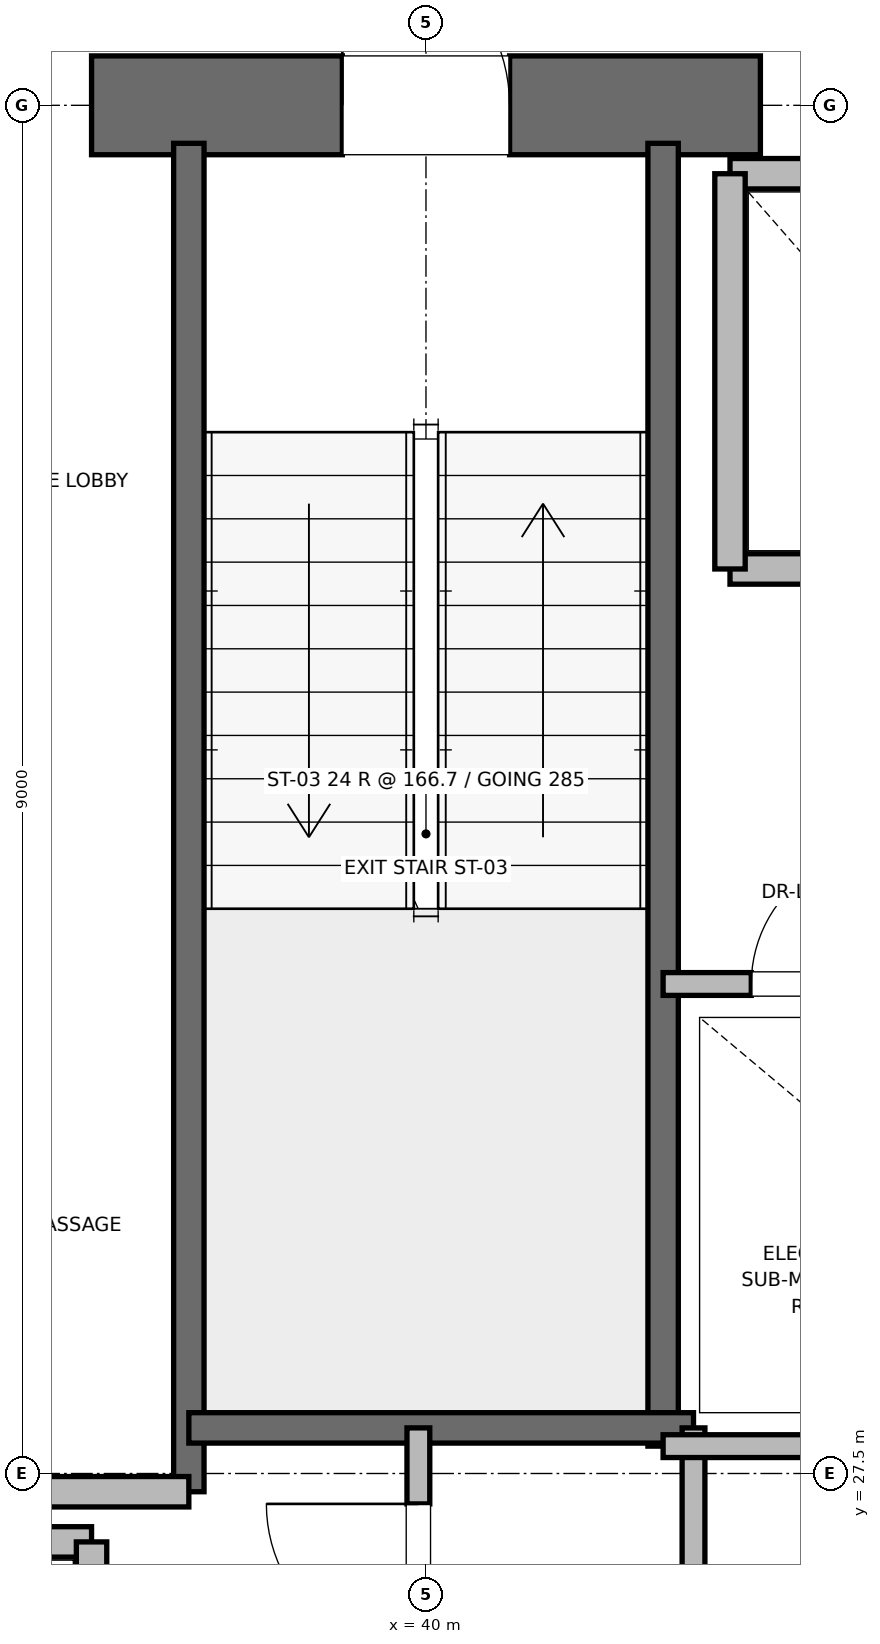
"""IFC4 building model, lengths in metres.
Left out: names, types, materials, properties, quantities, classifications, styles, units other than length and angle.
Written with IfcOpenShell. Run it as: python <this file> out.ifc"""

import sys

from ifc_helpers import new_model, si_unit, direction, frame, frame_2d, origin, place, context, subcontext, project, spatial, rectangle, extrude, element, fill, save


model = new_model("IFC4")
c1 = context("Model", 3, precision=1e-05, world=origin(), true_north=direction((0.0, 1.0)))
c2 = subcontext(c1, "Body", "Model", "MODEL_VIEW")
j1 = project(units=[si_unit("LENGTHUNIT", "METRE"), si_unit("PLANEANGLEUNIT", "RADIAN")], contexts=[c1])
p1 = place(None, origin())
s1 = spatial("IfcSite", under=j1, at=p1, CompositionType="ELEMENT")
p2 = place(p1, origin())
s2 = spatial("IfcBuilding", under=s1, at=p2, CompositionType="ELEMENT")
p3 = place(p2, frame((0.0, 0.0, 75.6)))
s3 = spatial("IfcBuildingStorey", under=s2, at=p3, CompositionType="ELEMENT", Elevation=75.6)
p4 = place(p3, frame((37.8, 36.5, 0.0), z_axis=(0.0, 0.0, 1.0), x_axis=(1.0, 0.0, 0.0)))
e1 = element("IfcWall", 1, at=p4, inside=s3, PredefinedType="SHEAR", context=c2, shape_type="SweptSolid", body=[
    extrude(rectangle(XDim=4.4, YDim=0.65, at=frame_2d((2.2, 0.0))), origin(), (0.0, 0.0, 1.0), 3.76),
])
p5 = place(p4, frame((1.65, 0.0, 0.0)))
e2 = element("IfcOpeningElement", 2, at=p5, cuts=e1, PredefinedType="OPENING", context=c2, shape_type="SweptSolid", body=[
    extrude(rectangle(XDim=1.1, YDim=2.15, at=frame_2d((0.55, 1.075))), frame((0.0, 0.325, 0.0), z_axis=(0.0, -1.0, 0.0), x_axis=(1.0, 0.0, 0.0)), (0.0, 0.0, 1.0), 0.65),
])
p6 = place(p3, frame((38.44, 27.38, 0.0), z_axis=(0.0, 0.0, 1.0), x_axis=(0.0, 1.0, 0.0)))
e3 = element("IfcWall", 3, at=p6, inside=s3, PredefinedType="SOLIDWALL", context=c2, shape_type="SweptSolid", body=[
    extrude(rectangle(XDim=8.87, YDim=0.2, at=frame_2d((4.435, 0.0))), origin(), (0.0, 0.0, 1.0), 3.76),
])
p7 = place(p3, frame((41.56, 27.68, 0.0), z_axis=(0.0, 0.0, 1.0), x_axis=(0.0, 1.0, 0.0)))
e4 = element("IfcWall", 4, at=p7, inside=s3, PredefinedType="SOLIDWALL", context=c2, shape_type="SweptSolid", body=[
    extrude(rectangle(XDim=8.57, YDim=0.2, at=frame_2d((4.285, 0.0))), origin(), (0.0, 0.0, 1.0), 3.76),
])
p8 = place(p3, frame((38.44, 27.8, 0.0), z_axis=(0.0, 0.0, 1.0), x_axis=(1.0, 0.0, 0.0)))
e5 = element("IfcWall", 5, at=p8, inside=s3, PredefinedType="SOLIDWALL", context=c2, shape_type="SweptSolid", body=[
    extrude(rectangle(XDim=3.32, YDim=0.2, at=frame_2d((1.66, 0.0))), origin(), (0.0, 0.0, 1.0), 3.76),
])
p9 = place(p3, frame((32.82, 27.38, 0.0), z_axis=(0.0, 0.0, 1.0), x_axis=(1.0, 0.0, 0.0)))
e6 = element("IfcWall", 6, at=p9, inside=s3, PredefinedType="PARTITIONING", context=c2, shape_type="SweptSolid", body=[
    extrude(rectangle(XDim=5.62, YDim=0.2, at=frame_2d((2.81, 0.0))), origin(), (0.0, 0.0, 1.0), 3.76),
])
p10 = place(p3, frame((37.8, 27.05, 0.0), z_axis=(0.0, 0.0, 1.0), x_axis=(-1.0, 0.0, 0.0)))
e7 = element("IfcWall", 7, at=p10, inside=s3, PredefinedType="SOLIDWALL", context=c2, shape_type="SweptSolid", body=[
    extrude(rectangle(XDim=2.3, YDim=0.2, at=frame_2d((1.15, 0.0))), origin(), (0.0, 0.0, 1.0), 3.76),
])
p11 = place(p3, frame((37.8, 24.45, 0.0), z_axis=(0.0, 0.0, 1.0), x_axis=(0.0, 1.0, 0.0)))
e8 = element("IfcWall", 8, at=p11, inside=s3, PredefinedType="SOLIDWALL", context=c2, shape_type="SweptSolid", body=[
    extrude(rectangle(XDim=2.6, YDim=0.2, at=frame_2d((1.3, 0.0))), origin(), (0.0, 0.0, 1.0), 3.76),
])
p12 = place(p3, frame((42.0, 33.45, 0.0), z_axis=(0.0, 0.0, 1.0), x_axis=(1.0, 0.0, 0.0)))
e9 = element("IfcWall", 9, at=p12, inside=s3, PredefinedType="SOLIDWALL", context=c2, shape_type="SweptSolid", body=[
    extrude(rectangle(XDim=2.3, YDim=0.2, at=frame_2d((1.15, 0.0))), origin(), (0.0, 0.0, 1.0), 3.76),
])
p13 = place(p3, frame((44.3, 36.05, 0.0), z_axis=(0.0, 0.0, 1.0), x_axis=(-1.0, 0.0, 0.0)))
e10 = element("IfcWall", 10, at=p13, inside=s3, PredefinedType="SOLIDWALL", context=c2, shape_type="SweptSolid", body=[
    extrude(rectangle(XDim=2.3, YDim=0.2, at=frame_2d((1.15, 0.0))), origin(), (0.0, 0.0, 1.0), 2.54),
])
p14 = place(p3, frame((42.0, 36.05, 0.0), z_axis=(0.0, 0.0, 1.0), x_axis=(0.0, -1.0, 0.0)))
e11 = element("IfcWall", 11, at=p14, inside=s3, PredefinedType="SOLIDWALL", context=c2, shape_type="SweptSolid", body=[
    extrude(rectangle(XDim=2.6, YDim=0.2, at=frame_2d((1.3, 0.0))), origin(), (0.0, 0.0, 1.0), 2.54),
])
p15 = place(p3, frame((41.76, 23.8, 0.0), z_axis=(0.0, 0.0, 1.0), x_axis=(0.0, 1.0, 0.0)))
e12 = element("IfcWall", 12, at=p15, inside=s3, PredefinedType="PARTITIONING", context=c2, shape_type="SweptSolid", body=[
    extrude(rectangle(XDim=4.0, YDim=0.15, at=frame_2d((2.0, 0.0))), origin(), (0.0, 0.0, 1.0), 2.85),
])
p16 = place(p3, frame((39.95, 25.8, 0.0), z_axis=(0.0, 0.0, 1.0), x_axis=(0.0, 1.0, 0.0)))
e13 = element("IfcWall", 13, at=p16, inside=s3, PredefinedType="PARTITIONING", context=c2, shape_type="SweptSolid", body=[
    extrude(rectangle(XDim=2.0, YDim=0.15, at=frame_2d((1.0, 0.0))), origin(), (0.0, 0.0, 1.0), 2.85),
])
p17 = place(p16, frame((0.5, 0.0, 0.0)))
e14 = element("IfcOpeningElement", 14, at=p17, cuts=e13, PredefinedType="OPENING", context=c2, shape_type="SweptSolid", body=[
    extrude(rectangle(XDim=1.0, YDim=2.15, at=frame_2d((0.5, 1.075))), frame((0.0, 0.075, 0.0), z_axis=(0.0, -1.0, 0.0), x_axis=(1.0, 0.0, 0.0)), (0.0, 0.0, 1.0), 0.15),
])
p18 = place(p3, frame((41.56, 27.68, 0.0), z_axis=(0.0, 0.0, 1.0), x_axis=(1.0, 0.0, 0.0)))
e15 = element("IfcWall", 15, at=p18, inside=s3, PredefinedType="PARTITIONING", context=c2, shape_type="SweptSolid", body=[
    extrude(rectangle(XDim=3.59, YDim=0.15, at=frame_2d((1.795, 0.0))), origin(), (0.0, 0.0, 1.0), 2.85),
])
p19 = place(p3, frame((41.56, 30.72, 0.0), z_axis=(0.0, 0.0, 1.0), x_axis=(1.0, 0.0, 0.0)))
e16 = element("IfcWall", 16, at=p19, inside=s3, PredefinedType="PARTITIONING", context=c2, shape_type="SweptSolid", body=[
    extrude(rectangle(XDim=2.04, YDim=0.15, at=frame_2d((1.02, 0.0))), origin(), (0.0, 0.0, 1.0), 2.85),
])
p20 = place(p19, frame((0.58, 0.0, 0.0)))
e17 = element("IfcOpeningElement", 17, at=p20, cuts=e16, PredefinedType="OPENING", context=c2, shape_type="SweptSolid", body=[
    extrude(rectangle(XDim=0.88, YDim=2.1, at=frame_2d((0.44, 1.05))), frame((0.0, 0.075, 0.0), z_axis=(0.0, -1.0, 0.0), x_axis=(1.0, 0.0, 0.0)), (0.0, 0.0, 1.0), 0.15),
])
p21 = place(p5, origin())
e18 = element("IfcDoor", 18, at=p21, inside=s3, OperationType="SINGLE_SWING_LEFT", PredefinedType="DOOR", context=c2, shape_type="SweptSolid", body=[
    extrude(rectangle(XDim=1.1, YDim=2.15, at=frame_2d((0.55, 1.075))), frame((0.0, 0.025, 0.0), z_axis=(0.0, -1.0, 0.0), x_axis=(1.0, 0.0, 0.0)), (0.0, 0.0, 1.0), 0.05),
])
fill(e2, e18)
p22 = place(p17, origin())
e19 = element("IfcDoor", 19, at=p22, inside=s3, OperationType="SINGLE_SWING_RIGHT", PredefinedType="DOOR", context=c2, shape_type="SweptSolid", body=[
    extrude(rectangle(XDim=1.0, YDim=2.15, at=frame_2d((0.5, 1.075))), frame((0.0, 0.025, 0.0), z_axis=(0.0, -1.0, 0.0), x_axis=(1.0, 0.0, 0.0)), (0.0, 0.0, 1.0), 0.05),
])
fill(e14, e19)
p23 = place(p20, origin())
e20 = element("IfcDoor", 20, at=p23, inside=s3, OperationType="SINGLE_SWING_RIGHT", PredefinedType="DOOR", context=c2, shape_type="SweptSolid", body=[
    extrude(rectangle(XDim=0.88, YDim=2.1, at=frame_2d((0.44, 1.05))), frame((0.0, 0.025, 0.0), z_axis=(0.0, -1.0, 0.0), x_axis=(1.0, 0.0, 0.0)), (0.0, 0.0, 1.0), 0.05),
])
fill(e17, e20)
save(model, sys.argv[1])
